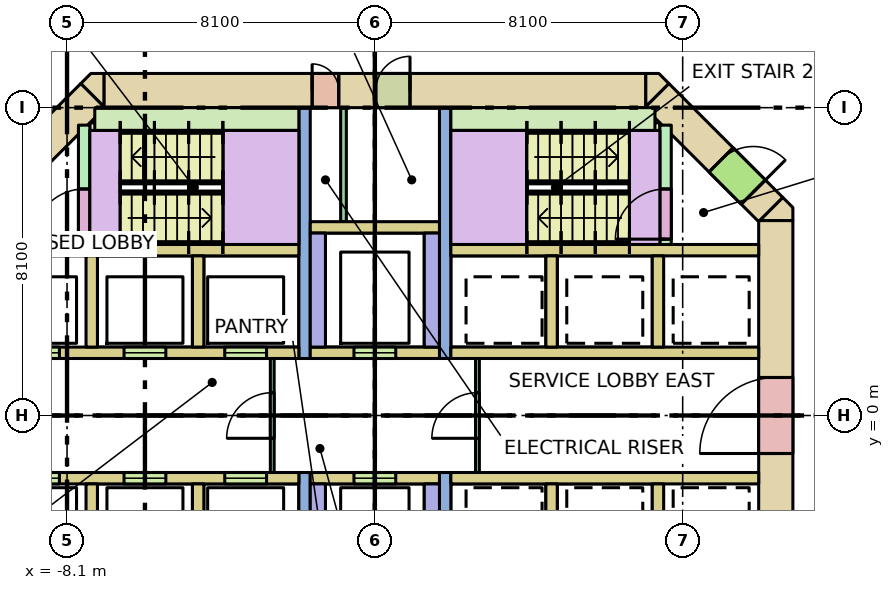
"""IFC4 building model, lengths in metres.
Left out: names, types, materials, properties, quantities, classifications, styles, units other than length and angle.
Written with IfcOpenShell. Run it as: python <this file> out.ifc"""

import sys

from ifc_helpers import new_model, si_unit, direction, frame, frame_2d, origin, place, context, subcontext, project, spatial, polyline, rectangle, outline, extrude, element, fill, save


model = new_model("IFC4")
c1 = context("Model", 3, precision=1e-05, world=origin(), true_north=direction((0.0, 1.0)))
c2 = subcontext(c1, "Body", "Model", "MODEL_VIEW")
j1 = project(units=[si_unit("LENGTHUNIT", "METRE"), si_unit("PLANEANGLEUNIT", "RADIAN")], contexts=[c1])
p1 = place(None, origin())
s1 = spatial("IfcSite", under=j1, at=p1, CompositionType="ELEMENT")
p2 = place(p1, origin())
s2 = spatial("IfcBuilding", under=s1, at=p2, CompositionType="ELEMENT")
p3 = place(p2, frame((0.0, 0.0, 6.0)))
s3 = spatial("IfcBuildingStorey", under=s2, at=p3, CompositionType="ELEMENT", Elevation=6.0)
p4 = place(p3, frame((-7.13, 8.55, -0.32), z_axis=(0.0, 0.0, 1.0), x_axis=(1.0, 0.0, 0.0)))
e1 = element("IfcWall", 1, at=p4, inside=s3, PredefinedType="SHEAR", context=c2, shape_type="SweptSolid", body=[
    extrude(rectangle(XDim=14.26, YDim=0.9, at=frame_2d((7.13, 0.0))), origin(), (0.0, 0.0, 1.0), 7.0),
])
p5 = place(p4, frame((5.48, 0.0, 0.32)))
e2 = element("IfcOpeningElement", 2, at=p5, cuts=e1, PredefinedType="OPENING", context=c2, shape_type="SweptSolid", body=[
    extrude(rectangle(XDim=0.7, YDim=2.1, at=frame_2d((0.35, 1.05))), frame((0.0, 0.46, 0.0), z_axis=(0.0, -1.0, 0.0), x_axis=(1.0, 0.0, 0.0)), (0.0, 0.0, 1.0), 0.92),
])
p6 = place(p4, frame((7.155, 0.0, 0.32)))
e3 = element("IfcOpeningElement", 3, at=p6, cuts=e1, PredefinedType="OPENING", context=c2, shape_type="SweptSolid", body=[
    extrude(rectangle(XDim=0.9, YDim=2.1, at=frame_2d((0.45, 1.05))), frame((0.0, 0.46, 0.0), z_axis=(0.0, -1.0, 0.0), x_axis=(1.0, 0.0, 0.0)), (0.0, 0.0, 1.0), 0.92),
])
p7 = place(p3, frame((10.55, -5.13, -0.32), z_axis=(0.0, 0.0, 1.0), x_axis=(0.0, 1.0, 0.0)))
e4 = element("IfcWall", 4, at=p7, inside=s3, PredefinedType="SHEAR", context=c2, shape_type="SweptSolid", body=[
    extrude(rectangle(XDim=10.26, YDim=0.9, at=frame_2d((5.13, 0.0))), origin(), (0.0, 0.0, 1.0), 7.0),
])
p8 = place(p7, frame((4.13, 0.0, 0.32)))
e5 = element("IfcOpeningElement", 5, at=p8, cuts=e4, PredefinedType="OPENING", context=c2, shape_type="SweptSolid", body=[
    extrude(rectangle(XDim=2.0, YDim=2.1, at=frame_2d((1.0, 1.05))), frame((0.0, 0.46, 0.0), z_axis=(0.0, -1.0, 0.0), x_axis=(1.0, 0.0, 0.0)), (0.0, 0.0, 1.0), 0.92),
])
p9 = place(p3, frame((-10.418, 5.418, -0.32), z_axis=(0.0, 0.0, 1.0), x_axis=(0.707106781187, 0.707106781187, 0.0)))
e6 = element("IfcWall", 6, at=p9, inside=s3, PredefinedType="SHEAR", context=c2, shape_type="SweptSolid", body=[
    extrude(rectangle(XDim=4.243, YDim=0.9, at=frame_2d((2.121, 0.0))), origin(), (0.0, 0.0, 1.0), 7.0),
])
p10 = place(p9, frame((0.65, 0.0, 0.32)))
e7 = element("IfcOpeningElement", 7, at=p10, cuts=e6, PredefinedType="OPENING", context=c2, shape_type="SweptSolid", body=[
    extrude(rectangle(XDim=1.2, YDim=2.1, at=frame_2d((0.6, 1.05))), frame((0.0, 0.46, 0.0), z_axis=(0.0, -1.0, 0.0), x_axis=(1.0, 0.0, 0.0)), (0.0, 0.0, 1.0), 0.92),
])
p11 = place(p3, frame((7.418, 8.418, -0.32), z_axis=(0.0, 0.0, 1.0), x_axis=(0.707106781187, -0.707106781187, 0.0)))
e8 = element("IfcWall", 8, at=p11, inside=s3, PredefinedType="SHEAR", context=c2, shape_type="SweptSolid", body=[
    extrude(rectangle(XDim=4.243, YDim=0.9, at=frame_2d((2.121, 0.0))), origin(), (0.0, 0.0, 1.0), 7.0),
])
p12 = place(p11, frame((2.393, 0.0, 0.32)))
e9 = element("IfcOpeningElement", 9, at=p12, cuts=e8, PredefinedType="OPENING", context=c2, shape_type="SweptSolid", body=[
    extrude(rectangle(XDim=1.2, YDim=2.1, at=frame_2d((0.6, 1.05))), frame((0.0, 0.46, 0.0), z_axis=(0.0, -1.0, 0.0), x_axis=(1.0, 0.0, 0.0)), (0.0, 0.0, 1.0), 0.92),
])
p13 = place(p3, frame((0.0, 0.0, -0.32)))
e10 = element("IfcWall", 10, at=p13, inside=s3, PredefinedType="SHEAR", context=c2, shape_type="SweptSolid", body=[
    extrude(outline(polyline([(11.0, 5.473), (11.0, 5.13), (10.13, 5.13), (10.736, 5.736), (11.0, 5.473)])), origin(), (0.0, 0.0, 1.0), 7.0),
])
p14 = place(p3, frame((0.0, 0.0, -0.32)))
e11 = element("IfcWall", 11, at=p14, inside=s3, PredefinedType="SHEAR", context=c2, shape_type="SweptSolid", body=[
    extrude(outline(polyline([(-7.473, 9.0), (-7.13, 9.0), (-7.13, 8.13), (-7.736, 8.736), (-7.473, 9.0)])), origin(), (0.0, 0.0, 1.0), 7.0),
])
p15 = place(p3, frame((0.0, 0.0, -0.32)))
e12 = element("IfcWall", 12, at=p15, inside=s3, PredefinedType="SHEAR", context=c2, shape_type="SweptSolid", body=[
    extrude(outline(polyline([(7.473, 9.0), (7.736, 8.736), (7.13, 8.13), (7.13, 9.0), (7.473, 9.0)])), origin(), (0.0, 0.0, 1.0), 7.0),
])
for number, where, z_axis, x_axis in (
    (13, (-10.1, 4.35, 0.0), (0.0, 0.0, 1.0), (1.0, 0.0, 0.0)),
    (14, (2.0, 4.35, 0.0), (0.0, 0.0, 1.0), (1.0, 0.0, 0.0)),
):
    element("IfcWall", number, at=place(p3, frame(where, z_axis=z_axis, x_axis=x_axis)), inside=s3, PredefinedType="SOLIDWALL", context=c2, shape_type="SweptSolid", body=[
        extrude(rectangle(XDim=8.1, YDim=0.3, at=frame_2d((4.05, 0.0))), origin(), (0.0, 0.0, 1.0), 6.68),
    ])
p16 = place(p3, frame((-10.1, 1.65, 0.0), z_axis=(0.0, 0.0, 1.0), x_axis=(1.0, 0.0, 0.0)))
e15 = element("IfcWall", 15, at=p16, inside=s3, PredefinedType="SOLIDWALL", context=c2, shape_type="SweptSolid", body=[
    extrude(rectangle(XDim=8.1, YDim=0.3, at=frame_2d((4.05, 0.0))), origin(), (0.0, 0.0, 1.0), 6.68),
])
p17 = place(p16, frame((0.7, 0.0, 0.0)))
e16 = element("IfcOpeningElement", 16, at=p17, cuts=e15, PredefinedType="OPENING", context=c2, shape_type="SweptSolid", body=[
    extrude(rectangle(XDim=1.1, YDim=2.1, at=frame_2d((0.55, 1.05))), frame((0.0, 0.16, 0.0), z_axis=(0.0, -1.0, 0.0), x_axis=(1.0, 0.0, 0.0)), (0.0, 0.0, 1.0), 0.32),
])
p18 = place(p16, frame((3.5, 0.0, 0.0)))
e17 = element("IfcOpeningElement", 17, at=p18, cuts=e15, PredefinedType="OPENING", context=c2, shape_type="SweptSolid", body=[
    extrude(rectangle(XDim=1.1, YDim=2.1, at=frame_2d((0.55, 1.05))), frame((0.0, 0.16, 0.0), z_axis=(0.0, -1.0, 0.0), x_axis=(1.0, 0.0, 0.0)), (0.0, 0.0, 1.0), 0.32),
])
p19 = place(p16, frame((6.15, 0.0, 0.0)))
e18 = element("IfcOpeningElement", 18, at=p19, cuts=e15, PredefinedType="OPENING", context=c2, shape_type="SweptSolid", body=[
    extrude(rectangle(XDim=1.1, YDim=2.1, at=frame_2d((0.55, 1.05))), frame((0.0, 0.16, 0.0), z_axis=(0.0, -1.0, 0.0), x_axis=(1.0, 0.0, 0.0)), (0.0, 0.0, 1.0), 0.32),
])
p20 = place(p3, frame((-10.1, -1.65, 0.0), z_axis=(0.0, 0.0, 1.0), x_axis=(1.0, 0.0, 0.0)))
e19 = element("IfcWall", 19, at=p20, inside=s3, PredefinedType="SOLIDWALL", context=c2, shape_type="SweptSolid", body=[
    extrude(rectangle(XDim=8.1, YDim=0.3, at=frame_2d((4.05, 0.0))), origin(), (0.0, 0.0, 1.0), 6.68),
])
p21 = place(p20, frame((0.7, 0.0, 0.0)))
e20 = element("IfcOpeningElement", 20, at=p21, cuts=e19, PredefinedType="OPENING", context=c2, shape_type="SweptSolid", body=[
    extrude(rectangle(XDim=1.1, YDim=2.1, at=frame_2d((0.55, 1.05))), frame((0.0, 0.16, 0.0), z_axis=(0.0, -1.0, 0.0), x_axis=(1.0, 0.0, 0.0)), (0.0, 0.0, 1.0), 0.32),
])
p22 = place(p20, frame((3.5, 0.0, 0.0)))
e21 = element("IfcOpeningElement", 21, at=p22, cuts=e19, PredefinedType="OPENING", context=c2, shape_type="SweptSolid", body=[
    extrude(rectangle(XDim=1.1, YDim=2.1, at=frame_2d((0.55, 1.05))), frame((0.0, 0.16, 0.0), z_axis=(0.0, -1.0, 0.0), x_axis=(1.0, 0.0, 0.0)), (0.0, 0.0, 1.0), 0.32),
])
p23 = place(p20, frame((6.15, 0.0, 0.0)))
e22 = element("IfcOpeningElement", 22, at=p23, cuts=e19, PredefinedType="OPENING", context=c2, shape_type="SweptSolid", body=[
    extrude(rectangle(XDim=1.1, YDim=2.1, at=frame_2d((0.55, 1.05))), frame((0.0, 0.16, 0.0), z_axis=(0.0, -1.0, 0.0), x_axis=(1.0, 0.0, 0.0)), (0.0, 0.0, 1.0), 0.32),
])
for number, where, z_axis, x_axis in (
    (23, (2.0, 1.65, 0.0), (0.0, 0.0, 1.0), (1.0, 0.0, 0.0)),
    (24, (2.0, -1.65, 0.0), (0.0, 0.0, 1.0), (1.0, 0.0, 0.0)),
):
    element("IfcWall", number, at=place(p3, frame(where, z_axis=z_axis, x_axis=x_axis)), inside=s3, PredefinedType="SOLIDWALL", context=c2, shape_type="SweptSolid", body=[
        extrude(rectangle(XDim=8.1, YDim=0.3, at=frame_2d((4.05, 0.0))), origin(), (0.0, 0.0, 1.0), 6.68),
    ])
for number, where, z_axis, x_axis in (
    (25, (-7.45, 1.8, 0.0), (0.0, 0.0, 1.0), (0.0, 1.0, 0.0)),
    (26, (-7.45, -4.2, 0.0), (0.0, 0.0, 1.0), (0.0, 1.0, 0.0)),
    (27, (-4.65, 1.8, 0.0), (0.0, 0.0, 1.0), (0.0, 1.0, 0.0)),
    (28, (-4.65, -4.2, 0.0), (0.0, 0.0, 1.0), (0.0, 1.0, 0.0)),
    (29, (4.65, 1.8, 0.0), (0.0, 0.0, 1.0), (0.0, 1.0, 0.0)),
    (30, (4.65, -4.2, 0.0), (0.0, 0.0, 1.0), (0.0, 1.0, 0.0)),
    (31, (7.45, 1.8, 0.0), (0.0, 0.0, 1.0), (0.0, 1.0, 0.0)),
    (32, (7.45, -4.2, 0.0), (0.0, 0.0, 1.0), (0.0, 1.0, 0.0)),
):
    element("IfcWall", number, at=place(p3, frame(where, z_axis=z_axis, x_axis=x_axis)), inside=s3, PredefinedType="SOLIDWALL", context=c2, shape_type="SweptSolid", body=[
        extrude(rectangle(XDim=2.4, YDim=0.3, at=frame_2d((1.2, 0.0))), origin(), (0.0, 0.0, 1.0), 6.68),
    ])
for number, where, z_axis, x_axis in (
    (33, (-1.85, 1.5, 0.0), (0.0, 0.0, 1.0), (0.0, 1.0, 0.0)),
    (34, (-1.85, -8.1, 0.0), (0.0, 0.0, 1.0), (0.0, 1.0, 0.0)),
    (35, (1.85, 1.5, 0.0), (0.0, 0.0, 1.0), (0.0, 1.0, 0.0)),
    (36, (1.85, -8.1, 0.0), (0.0, 0.0, 1.0), (0.0, 1.0, 0.0)),
):
    element("IfcWall", number, at=place(p3, frame(where, z_axis=z_axis, x_axis=x_axis)), inside=s3, PredefinedType="SHEAR", context=c2, shape_type="SweptSolid", body=[
        extrude(rectangle(XDim=6.6, YDim=0.3, at=frame_2d((3.3, 0.0))), origin(), (0.0, 0.0, 1.0), 6.68),
    ])
p24 = place(p3, frame((-1.7, 1.65, 0.0), z_axis=(0.0, 0.0, 1.0), x_axis=(1.0, 0.0, 0.0)))
e37 = element("IfcWall", 37, at=p24, inside=s3, PredefinedType="SOLIDWALL", context=c2, shape_type="SweptSolid", body=[
    extrude(rectangle(XDim=3.4, YDim=0.3, at=frame_2d((1.7, 0.0))), origin(), (0.0, 0.0, 1.0), 6.68),
])
p25 = place(p24, frame((1.15, 0.0, 0.0)))
e38 = element("IfcOpeningElement", 38, at=p25, cuts=e37, PredefinedType="OPENING", context=c2, shape_type="SweptSolid", body=[
    extrude(rectangle(XDim=1.1, YDim=2.1, at=frame_2d((0.55, 1.05))), frame((0.0, 0.16, 0.0), z_axis=(0.0, -1.0, 0.0), x_axis=(1.0, 0.0, 0.0)), (0.0, 0.0, 1.0), 0.32),
])
p26 = place(p3, frame((-1.7, -1.65, 0.0), z_axis=(0.0, 0.0, 1.0), x_axis=(1.0, 0.0, 0.0)))
e39 = element("IfcWall", 39, at=p26, inside=s3, PredefinedType="SOLIDWALL", context=c2, shape_type="SweptSolid", body=[
    extrude(rectangle(XDim=3.4, YDim=0.3, at=frame_2d((1.7, 0.0))), origin(), (0.0, 0.0, 1.0), 6.68),
])
p27 = place(p26, frame((1.15, 0.0, 0.0)))
e40 = element("IfcOpeningElement", 40, at=p27, cuts=e39, PredefinedType="OPENING", context=c2, shape_type="SweptSolid", body=[
    extrude(rectangle(XDim=1.1, YDim=2.1, at=frame_2d((0.55, 1.05))), frame((0.0, 0.16, 0.0), z_axis=(0.0, -1.0, 0.0), x_axis=(1.0, 0.0, 0.0)), (0.0, 0.0, 1.0), 0.32),
])
for number, where, z_axis, x_axis in (
    (41, (-1.5, 1.8, 0.0), (0.0, 0.0, 1.0), (0.0, 1.0, 0.0)),
    (42, (-1.5, -4.8, 0.0), (0.0, 0.0, 1.0), (0.0, 1.0, 0.0)),
    (43, (1.5, 1.8, 0.0), (0.0, 0.0, 1.0), (0.0, 1.0, 0.0)),
    (44, (1.5, -4.8, 0.0), (0.0, 0.0, 1.0), (0.0, 1.0, 0.0)),
):
    element("IfcWall", number, at=place(p3, frame(where, z_axis=z_axis, x_axis=x_axis)), inside=s3, PredefinedType="SOLIDWALL", context=c2, shape_type="SweptSolid", body=[
        extrude(rectangle(XDim=3.0, YDim=0.4, at=frame_2d((1.5, 0.0))), origin(), (0.0, 0.0, 1.0), 6.68),
    ])
p28 = place(p3, frame((-1.7, 4.95, 0.0), z_axis=(0.0, 0.0, 1.0), x_axis=(1.0, 0.0, 0.0)))
e45 = element("IfcWall", 45, at=p28, inside=s3, PredefinedType="SOLIDWALL", context=c2, shape_type="SweptSolid", body=[
    extrude(rectangle(XDim=3.4, YDim=0.3, at=frame_2d((1.7, 0.0))), origin(), (0.0, 0.0, 1.0), 6.68),
])
p29 = place(p3, frame((-7.65, 4.5, 0.0), z_axis=(0.0, 0.0, 1.0), x_axis=(0.0, 1.0, 0.0)))
e46 = element("IfcWall", 46, at=p29, inside=s3, PredefinedType="SHEAR", context=c2, shape_type="SweptSolid", body=[
    extrude(rectangle(XDim=3.14, YDim=0.3, at=frame_2d((1.57, 0.0))), origin(), (0.0, 0.0, 1.0), 6.68),
])
p30 = place(p29, frame((0.14, 0.0, 0.0)))
e47 = element("IfcOpeningElement", 47, at=p30, cuts=e46, PredefinedType="OPENING", context=c2, shape_type="SweptSolid", body=[
    extrude(rectangle(XDim=1.32, YDim=2.1, at=frame_2d((0.66, 1.05))), frame((0.0, 0.16, 0.0), z_axis=(0.0, -1.0, 0.0), x_axis=(1.0, 0.0, 0.0)), (0.0, 0.0, 1.0), 0.32),
])
p31 = place(p3, frame((-7.37, 7.8, 0.0), z_axis=(0.0, 0.0, 1.0), x_axis=(1.0, 0.0, 0.0)))
e48 = element("IfcWall", 48, at=p31, inside=s3, PredefinedType="SHEAR", context=c2, shape_type="SweptSolid", body=[
    extrude(rectangle(XDim=5.37, YDim=0.6, at=frame_2d((2.685, 0.0))), origin(), (0.0, 0.0, 1.0), 6.68),
])
p32 = place(p3, frame((7.65, 4.5, 0.0), z_axis=(0.0, 0.0, 1.0), x_axis=(0.0, 1.0, 0.0)))
e49 = element("IfcWall", 49, at=p32, inside=s3, PredefinedType="SHEAR", context=c2, shape_type="SweptSolid", body=[
    extrude(rectangle(XDim=3.14, YDim=0.3, at=frame_2d((1.57, 0.0))), origin(), (0.0, 0.0, 1.0), 6.68),
])
p33 = place(p32, frame((0.14, 0.0, 0.0)))
e50 = element("IfcOpeningElement", 50, at=p33, cuts=e49, PredefinedType="OPENING", context=c2, shape_type="SweptSolid", body=[
    extrude(rectangle(XDim=1.32, YDim=2.1, at=frame_2d((0.66, 1.05))), frame((0.0, 0.16, 0.0), z_axis=(0.0, -1.0, 0.0), x_axis=(1.0, 0.0, 0.0)), (0.0, 0.0, 1.0), 0.32),
])
p34 = place(p3, frame((2.0, 7.8, 0.0), z_axis=(0.0, 0.0, 1.0), x_axis=(1.0, 0.0, 0.0)))
e51 = element("IfcWall", 51, at=p34, inside=s3, PredefinedType="SHEAR", context=c2, shape_type="SweptSolid", body=[
    extrude(rectangle(XDim=5.37, YDim=0.6, at=frame_2d((2.685, 0.0))), origin(), (0.0, 0.0, 1.0), 6.68),
])
for number, where, z_axis, x_axis in (
    (52, (-7.5, 7.6, 0.0), (0.0, 0.0, 1.0), (1.0, 0.0, 0.0)),
    (53, (6.9, 7.6, 0.0), (0.0, 0.0, 1.0), (1.0, 0.0, 0.0)),
):
    element("IfcWall", number, at=place(p3, frame(where, z_axis=z_axis, x_axis=x_axis)), inside=s3, PredefinedType="SHEAR", context=c2, shape_type="SweptSolid", body=[
        extrude(rectangle(XDim=0.6, YDim=0.2, at=frame_2d((0.3, 0.0))), origin(), (0.0, 0.0, 1.0), 6.68),
    ])
p35 = place(p3, frame((-2.7, -1.5, 0.0), z_axis=(0.0, 0.0, 1.0), x_axis=(0.0, 1.0, 0.0)))
e54 = element("IfcWall", 54, at=p35, inside=s3, PredefinedType="PARTITIONING", context=c2, shape_type="SweptSolid", body=[
    extrude(rectangle(XDim=3.0, YDim=0.1, at=frame_2d((1.5, 0.0))), origin(), (0.0, 0.0, 1.0), 6.68),
])
p36 = place(p35, frame((0.9, 0.0, 0.0)))
e55 = element("IfcOpeningElement", 55, at=p36, cuts=e54, PredefinedType="OPENING", context=c2, shape_type="SweptSolid", body=[
    extrude(rectangle(XDim=1.2, YDim=2.1, at=frame_2d((0.6, 1.05))), frame((0.0, 0.06, 0.0), z_axis=(0.0, -1.0, 0.0), x_axis=(1.0, 0.0, 0.0)), (0.0, 0.0, 1.0), 0.12),
])
p37 = place(p3, frame((2.7, -1.5, 0.0), z_axis=(0.0, 0.0, 1.0), x_axis=(0.0, 1.0, 0.0)))
e56 = element("IfcWall", 56, at=p37, inside=s3, PredefinedType="PARTITIONING", context=c2, shape_type="SweptSolid", body=[
    extrude(rectangle(XDim=3.0, YDim=0.1, at=frame_2d((1.5, 0.0))), origin(), (0.0, 0.0, 1.0), 6.68),
])
p38 = place(p37, frame((0.9, 0.0, 0.0)))
e57 = element("IfcOpeningElement", 57, at=p38, cuts=e56, PredefinedType="OPENING", context=c2, shape_type="SweptSolid", body=[
    extrude(rectangle(XDim=1.2, YDim=2.1, at=frame_2d((0.6, 1.05))), frame((0.0, 0.06, 0.0), z_axis=(0.0, -1.0, 0.0), x_axis=(1.0, 0.0, 0.0)), (0.0, 0.0, 1.0), 0.12),
])
p39 = place(p3, frame((-0.825, 5.1, 0.0), z_axis=(0.0, 0.0, 1.0), x_axis=(0.0, 1.0, 0.0)))
e58 = element("IfcWall", 58, at=p39, inside=s3, PredefinedType="PARTITIONING", context=c2, shape_type="SweptSolid", body=[
    extrude(rectangle(XDim=3.0, YDim=0.15, at=frame_2d((1.5, 0.0))), origin(), (0.0, 0.0, 1.0), 6.68),
])
p40 = place(p17, origin())
e59 = element("IfcDoor", 59, at=p40, inside=s3, OperationType="DOUBLE_DOOR_SLIDING", PredefinedType="DOOR", context=c2, shape_type="SweptSolid", body=[
    extrude(rectangle(XDim=1.1, YDim=2.1, at=frame_2d((0.55, 1.05))), frame((0.0, 0.025, 0.0), z_axis=(0.0, -1.0, 0.0), x_axis=(1.0, 0.0, 0.0)), (0.0, 0.0, 1.0), 0.05),
])
fill(e16, e59)
p41 = place(p18, origin())
e60 = element("IfcDoor", 60, at=p41, inside=s3, OperationType="DOUBLE_DOOR_SLIDING", PredefinedType="DOOR", context=c2, shape_type="SweptSolid", body=[
    extrude(rectangle(XDim=1.1, YDim=2.1, at=frame_2d((0.55, 1.05))), frame((0.0, 0.025, 0.0), z_axis=(0.0, -1.0, 0.0), x_axis=(1.0, 0.0, 0.0)), (0.0, 0.0, 1.0), 0.05),
])
fill(e17, e60)
p42 = place(p19, origin())
e61 = element("IfcDoor", 61, at=p42, inside=s3, OperationType="DOUBLE_DOOR_SLIDING", PredefinedType="DOOR", context=c2, shape_type="SweptSolid", body=[
    extrude(rectangle(XDim=1.1, YDim=2.1, at=frame_2d((0.55, 1.05))), frame((0.0, 0.025, 0.0), z_axis=(0.0, -1.0, 0.0), x_axis=(1.0, 0.0, 0.0)), (0.0, 0.0, 1.0), 0.05),
])
fill(e18, e61)
p43 = place(p21, origin())
e62 = element("IfcDoor", 62, at=p43, inside=s3, OperationType="DOUBLE_DOOR_SLIDING", PredefinedType="DOOR", context=c2, shape_type="SweptSolid", body=[
    extrude(rectangle(XDim=1.1, YDim=2.1, at=frame_2d((0.55, 1.05))), frame((0.0, 0.025, 0.0), z_axis=(0.0, -1.0, 0.0), x_axis=(1.0, 0.0, 0.0)), (0.0, 0.0, 1.0), 0.05),
])
fill(e20, e62)
p44 = place(p22, origin())
e63 = element("IfcDoor", 63, at=p44, inside=s3, OperationType="DOUBLE_DOOR_SLIDING", PredefinedType="DOOR", context=c2, shape_type="SweptSolid", body=[
    extrude(rectangle(XDim=1.1, YDim=2.1, at=frame_2d((0.55, 1.05))), frame((0.0, 0.025, 0.0), z_axis=(0.0, -1.0, 0.0), x_axis=(1.0, 0.0, 0.0)), (0.0, 0.0, 1.0), 0.05),
])
fill(e21, e63)
p45 = place(p23, origin())
e64 = element("IfcDoor", 64, at=p45, inside=s3, OperationType="DOUBLE_DOOR_SLIDING", PredefinedType="DOOR", context=c2, shape_type="SweptSolid", body=[
    extrude(rectangle(XDim=1.1, YDim=2.1, at=frame_2d((0.55, 1.05))), frame((0.0, 0.025, 0.0), z_axis=(0.0, -1.0, 0.0), x_axis=(1.0, 0.0, 0.0)), (0.0, 0.0, 1.0), 0.05),
])
fill(e22, e64)
p46 = place(p25, origin())
e65 = element("IfcDoor", 65, at=p46, inside=s3, OperationType="DOUBLE_DOOR_SLIDING", PredefinedType="DOOR", context=c2, shape_type="SweptSolid", body=[
    extrude(rectangle(XDim=1.1, YDim=2.1, at=frame_2d((0.55, 1.05))), frame((0.0, 0.025, 0.0), z_axis=(0.0, -1.0, 0.0), x_axis=(1.0, 0.0, 0.0)), (0.0, 0.0, 1.0), 0.05),
])
fill(e38, e65)
p47 = place(p27, origin())
e66 = element("IfcDoor", 66, at=p47, inside=s3, OperationType="DOUBLE_DOOR_SLIDING", PredefinedType="DOOR", context=c2, shape_type="SweptSolid", body=[
    extrude(rectangle(XDim=1.1, YDim=2.1, at=frame_2d((0.55, 1.05))), frame((0.0, 0.025, 0.0), z_axis=(0.0, -1.0, 0.0), x_axis=(1.0, 0.0, 0.0)), (0.0, 0.0, 1.0), 0.05),
])
fill(e40, e66)
p48 = place(p30, origin())
e67 = element("IfcDoor", 67, at=p48, inside=s3, OperationType="DOUBLE_DOOR_SINGLE_SWING", PredefinedType="DOOR", context=c2, shape_type="SweptSolid", body=[
    extrude(rectangle(XDim=1.32, YDim=2.1, at=frame_2d((0.66, 1.05))), frame((0.0, 0.025, 0.0), z_axis=(0.0, -1.0, 0.0), x_axis=(1.0, 0.0, 0.0)), (0.0, 0.0, 1.0), 0.05),
])
fill(e47, e67)
p49 = place(p33, origin())
e68 = element("IfcDoor", 68, at=p49, inside=s3, OperationType="DOUBLE_DOOR_SINGLE_SWING", PredefinedType="DOOR", context=c2, shape_type="SweptSolid", body=[
    extrude(rectangle(XDim=1.32, YDim=2.1, at=frame_2d((0.66, 1.05))), frame((0.0, 0.025, 0.0), z_axis=(0.0, -1.0, 0.0), x_axis=(1.0, 0.0, 0.0)), (0.0, 0.0, 1.0), 0.05),
])
fill(e50, e68)
p50 = place(p12, origin())
e69 = element("IfcDoor", 69, at=p50, inside=s3, OperationType="SINGLE_SWING_RIGHT", PredefinedType="DOOR", context=c2, shape_type="SweptSolid", body=[
    extrude(rectangle(XDim=1.2, YDim=2.1, at=frame_2d((0.6, 1.05))), frame((0.0, 0.025, 0.0), z_axis=(0.0, -1.0, 0.0), x_axis=(1.0, 0.0, 0.0)), (0.0, 0.0, 1.0), 0.05),
])
fill(e9, e69)
p51 = place(p8, origin())
e70 = element("IfcDoor", 70, at=p51, inside=s3, OperationType="DOUBLE_DOOR_SINGLE_SWING", PredefinedType="DOOR", context=c2, shape_type="SweptSolid", body=[
    extrude(rectangle(XDim=2.0, YDim=2.1, at=frame_2d((1.0, 1.05))), frame((0.0, 0.025, 0.0), z_axis=(0.0, -1.0, 0.0), x_axis=(1.0, 0.0, 0.0)), (0.0, 0.0, 1.0), 0.05),
])
fill(e5, e70)
p52 = place(p36, origin())
e71 = element("IfcDoor", 71, at=p52, inside=s3, OperationType="SINGLE_SWING_LEFT", PredefinedType="DOOR", context=c2, shape_type="SweptSolid", body=[
    extrude(rectangle(XDim=1.2, YDim=2.1, at=frame_2d((0.6, 1.05))), frame((0.0, 0.025, 0.0), z_axis=(0.0, -1.0, 0.0), x_axis=(1.0, 0.0, 0.0)), (0.0, 0.0, 1.0), 0.05),
])
fill(e55, e71)
p53 = place(p38, origin())
e72 = element("IfcDoor", 72, at=p53, inside=s3, OperationType="SINGLE_SWING_LEFT", PredefinedType="DOOR", context=c2, shape_type="SweptSolid", body=[
    extrude(rectangle(XDim=1.2, YDim=2.1, at=frame_2d((0.6, 1.05))), frame((0.0, 0.025, 0.0), z_axis=(0.0, -1.0, 0.0), x_axis=(1.0, 0.0, 0.0)), (0.0, 0.0, 1.0), 0.05),
])
fill(e57, e72)
p54 = place(p5, origin())
e73 = element("IfcDoor", 73, at=p54, inside=s3, OperationType="SINGLE_SWING_LEFT", PredefinedType="DOOR", context=c2, shape_type="SweptSolid", body=[
    extrude(rectangle(XDim=0.7, YDim=2.1, at=frame_2d((0.35, 1.05))), frame((0.0, 0.025, 0.0), z_axis=(0.0, -1.0, 0.0), x_axis=(1.0, 0.0, 0.0)), (0.0, 0.0, 1.0), 0.05),
])
fill(e2, e73)
p55 = place(p6, origin())
e74 = element("IfcDoor", 74, at=p55, inside=s3, OperationType="SINGLE_SWING_RIGHT", PredefinedType="DOOR", context=c2, shape_type="SweptSolid", body=[
    extrude(rectangle(XDim=0.9, YDim=2.1, at=frame_2d((0.45, 1.05))), frame((0.0, 0.025, 0.0), z_axis=(0.0, -1.0, 0.0), x_axis=(1.0, 0.0, 0.0)), (0.0, 0.0, 1.0), 0.05),
])
fill(e3, e74)
save(model, sys.argv[1])
